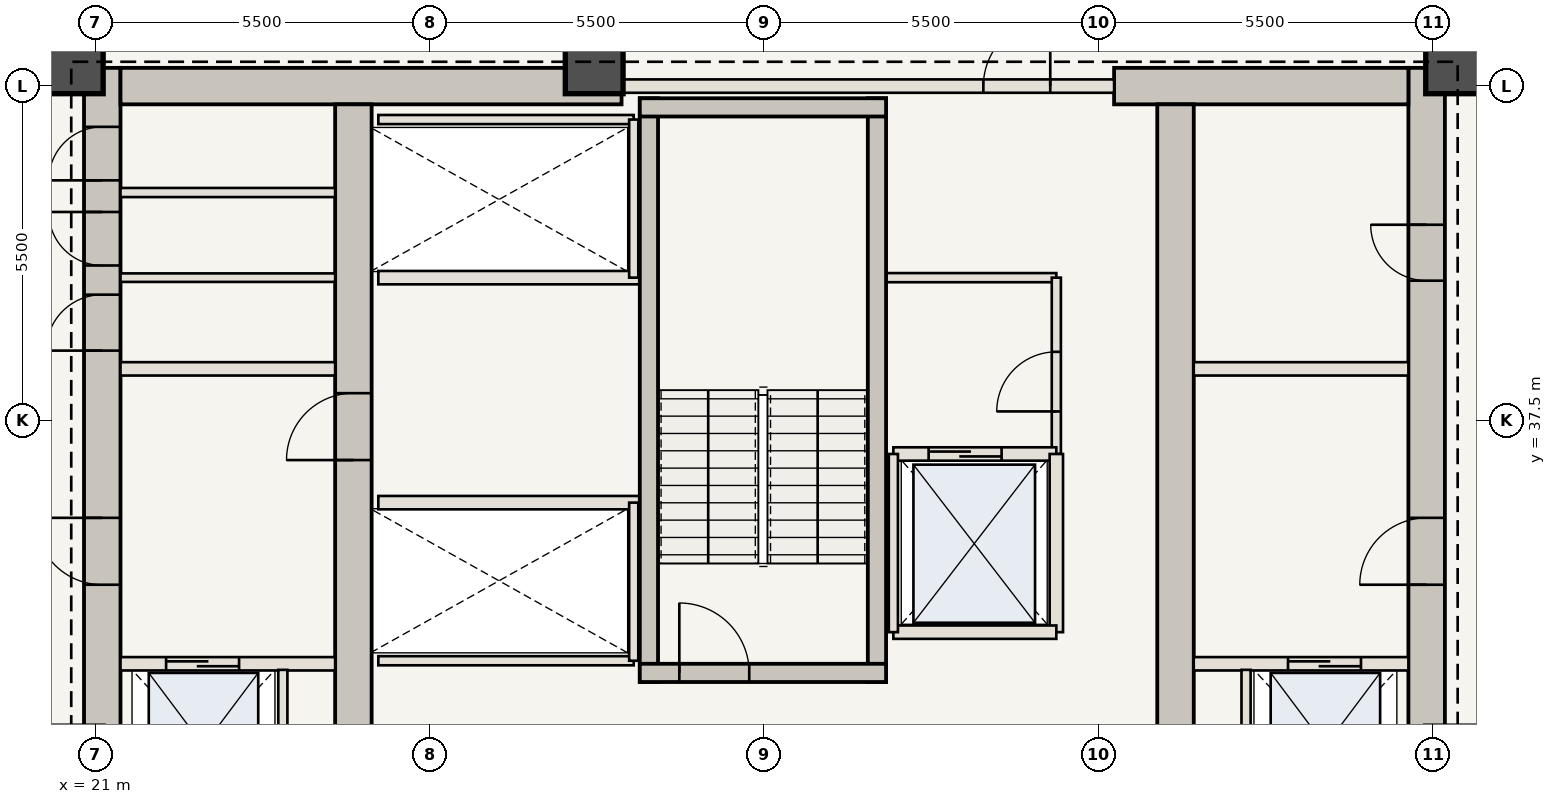
"""IFC4 building model, lengths in metres.
Left out: names, types, materials, properties, quantities, classifications, styles, units other than length and angle.
Written with IfcOpenShell. Run it as: python <this file> out.ifc"""

import sys

from ifc_helpers import new_model, si_unit, direction, frame, frame_2d, origin, origin_2d, place, context, subcontext, project, spatial, rectangle, extrude, element, fill, save


model = new_model("IFC4")
c1 = context("Model", 3, precision=1e-05, world=origin(), true_north=direction((0.0, 1.0)))
c2 = subcontext(c1, "Body", "Model", "MODEL_VIEW")
j1 = project(units=[si_unit("LENGTHUNIT", "METRE"), si_unit("PLANEANGLEUNIT", "RADIAN")], contexts=[c1])
p1 = place(None, origin())
s1 = spatial("IfcSite", under=j1, at=p1, CompositionType="ELEMENT")
p2 = place(p1, origin())
s2 = spatial("IfcBuilding", under=s1, at=p2, CompositionType="ELEMENT")
p3 = place(p2, frame((0.0, 0.0, 164.5)))
s3 = spatial("IfcBuildingStorey", under=s2, at=p3, CompositionType="ELEMENT", Elevation=164.5)
p4 = place(p3, frame((21.11, 30.6, 0.0), z_axis=(0.0, 0.0, 1.0), x_axis=(0.0, 1.0, 0.0)))
e1 = element("IfcWall", 1, at=p4, inside=s3, PredefinedType="SHEAR", context=c2, shape_type="SweptSolid", body=[
    extrude(rectangle(XDim=12.7, YDim=0.6, at=frame_2d((6.35, 0.0))), origin(), (0.0, 0.0, 1.0), 3.85),
])
p5 = place(p4, frame((4.2, 0.0, 0.0)))
e2 = element("IfcOpeningElement", 2, at=p5, cuts=e1, PredefinedType="OPENING", context=c2, shape_type="SweptSolid", body=[
    extrude(rectangle(XDim=1.1, YDim=2.15, at=frame_2d((0.55, 1.075))), frame((0.0, 0.31, 0.0), z_axis=(0.0, -1.0, 0.0), x_axis=(1.0, 0.0, 0.0)), (0.0, 0.0, 1.0), 0.62),
])
p6 = place(p4, frame((8.05, 0.0, 0.0)))
e3 = element("IfcOpeningElement", 3, at=p6, cuts=e1, PredefinedType="OPENING", context=c2, shape_type="SweptSolid", body=[
    extrude(rectangle(XDim=0.92, YDim=2.1, at=frame_2d((0.46, 1.05))), frame((0.0, 0.31, 0.0), z_axis=(0.0, -1.0, 0.0), x_axis=(1.0, 0.0, 0.0)), (0.0, 0.0, 1.0), 0.62),
])
p7 = place(p4, frame((9.45, 0.0, 0.0)))
e4 = element("IfcOpeningElement", 4, at=p7, cuts=e1, PredefinedType="OPENING", context=c2, shape_type="SweptSolid", body=[
    extrude(rectangle(XDim=0.88, YDim=2.1, at=frame_2d((0.44, 1.05))), frame((0.0, 0.31, 0.0), z_axis=(0.0, -1.0, 0.0), x_axis=(1.0, 0.0, 0.0)), (0.0, 0.0, 1.0), 0.62),
])
p8 = place(p4, frame((10.85, 0.0, 0.0)))
e5 = element("IfcOpeningElement", 5, at=p8, cuts=e1, PredefinedType="OPENING", context=c2, shape_type="SweptSolid", body=[
    extrude(rectangle(XDim=0.88, YDim=2.1, at=frame_2d((0.44, 1.05))), frame((0.0, 0.31, 0.0), z_axis=(0.0, -1.0, 0.0), x_axis=(1.0, 0.0, 0.0)), (0.0, 0.0, 1.0), 0.62),
])
p9 = place(p3, frame((42.89, 30.6, 0.0), z_axis=(0.0, 0.0, 1.0), x_axis=(0.0, 1.0, 0.0)))
e6 = element("IfcWall", 6, at=p9, inside=s3, PredefinedType="SHEAR", context=c2, shape_type="SweptSolid", body=[
    extrude(rectangle(XDim=12.7, YDim=0.6, at=frame_2d((6.35, 0.0))), origin(), (0.0, 0.0, 1.0), 3.85),
])
p10 = place(p9, frame((4.2, 0.0, 0.0)))
e7 = element("IfcOpeningElement", 7, at=p10, cuts=e6, PredefinedType="OPENING", context=c2, shape_type="SweptSolid", body=[
    extrude(rectangle(XDim=1.1, YDim=2.15, at=frame_2d((0.55, 1.075))), frame((0.0, 0.31, 0.0), z_axis=(0.0, -1.0, 0.0), x_axis=(1.0, 0.0, 0.0)), (0.0, 0.0, 1.0), 0.62),
])
p11 = place(p9, frame((9.2, 0.0, 0.0)))
e8 = element("IfcOpeningElement", 8, at=p11, cuts=e6, PredefinedType="OPENING", context=c2, shape_type="SweptSolid", body=[
    extrude(rectangle(XDim=0.92, YDim=2.1, at=frame_2d((0.46, 1.05))), frame((0.0, 0.31, 0.0), z_axis=(0.0, -1.0, 0.0), x_axis=(1.0, 0.0, 0.0)), (0.0, 0.0, 1.0), 0.62),
])
p12 = place(p3, frame((21.41, 43.0, 0.0), z_axis=(0.0, 0.0, 1.0), x_axis=(1.0, 0.0, 0.0)))
e9 = element("IfcWall", 9, at=p12, inside=s3, PredefinedType="SHEAR", context=c2, shape_type="SweptSolid", body=[
    extrude(rectangle(XDim=8.24, YDim=0.6, at=frame_2d((4.12, 0.0))), origin(), (0.0, 0.0, 1.0), 3.85),
])
p13 = place(p3, frame((37.75, 43.0, 0.0), z_axis=(0.0, 0.0, 1.0), x_axis=(1.0, 0.0, 0.0)))
e10 = element("IfcWall", 10, at=p13, inside=s3, PredefinedType="SHEAR", context=c2, shape_type="SweptSolid", body=[
    extrude(rectangle(XDim=4.84, YDim=0.6, at=frame_2d((2.42, 0.0))), origin(), (0.0, 0.0, 1.0), 3.85),
])
p14 = place(p3, frame((25.24, 30.6, 0.0), z_axis=(0.0, 0.0, 1.0), x_axis=(0.0, 1.0, 0.0)))
e11 = element("IfcWall", 11, at=p14, inside=s3, PredefinedType="SHEAR", context=c2, shape_type="SweptSolid", body=[
    extrude(rectangle(XDim=12.1, YDim=0.6, at=frame_2d((6.05, 0.0))), origin(), (0.0, 0.0, 1.0), 3.85),
])
p15 = place(p14, frame((6.25, 0.0, 0.0)))
e12 = element("IfcOpeningElement", 12, at=p15, cuts=e11, PredefinedType="OPENING", context=c2, shape_type="SweptSolid", body=[
    extrude(rectangle(XDim=1.1, YDim=2.15, at=frame_2d((0.55, 1.075))), frame((0.0, 0.31, 0.0), z_axis=(0.0, -1.0, 0.0), x_axis=(1.0, 0.0, 0.0)), (0.0, 0.0, 1.0), 0.62),
])
p16 = place(p3, frame((38.76, 30.6, 0.0), z_axis=(0.0, 0.0, 1.0), x_axis=(0.0, 1.0, 0.0)))
e13 = element("IfcWall", 13, at=p16, inside=s3, PredefinedType="SHEAR", context=c2, shape_type="SweptSolid", body=[
    extrude(rectangle(XDim=12.1, YDim=0.6, at=frame_2d((6.05, 0.0))), origin(), (0.0, 0.0, 1.0), 3.85),
])
for number, where, z_axis, x_axis in (
    (14, (43.35, 43.35, 0.0), (0.0, 0.0, 1.0), (1.0, 0.0, 0.0)),
    (15, (29.2, 43.35, 0.0), (0.0, 0.0, 1.0), (1.0, 0.0, 0.0)),
    (16, (20.65, 43.35, 0.0), (0.0, 0.0, 1.0), (1.0, 0.0, 0.0)),
):
    element("IfcColumn", number, at=place(p3, frame(where, z_axis=z_axis, x_axis=x_axis)), inside=s3, PredefinedType="COLUMN", context=c2, shape_type="SweptSolid", body=[
        extrude(rectangle(XDim=0.95, YDim=0.95, at=origin_2d()), origin(), (0.0, 0.0, 1.0), 3.85),
    ])
p17 = place(p3, frame((21.41, 33.5, 0.0), z_axis=(0.0, 0.0, 1.0), x_axis=(1.0, 0.0, 0.0)))
e17 = element("IfcWall", 17, at=p17, inside=s3, PredefinedType="STANDARD", context=c2, shape_type="SweptSolid", body=[
    extrude(rectangle(XDim=3.53, YDim=0.22, at=frame_2d((1.765, 0.0))), origin(), (0.0, 0.0, 1.0), 3.685),
])
p18 = place(p17, frame((0.75, 0.0, 0.0)))
e18 = element("IfcOpeningElement", 18, at=p18, cuts=e17, PredefinedType="OPENING", context=c2, shape_type="SweptSolid", body=[
    extrude(rectangle(XDim=1.2, YDim=2.2, at=frame_2d((0.6, 1.1))), frame((0.0, 0.12, 0.0), z_axis=(0.0, -1.0, 0.0), x_axis=(1.0, 0.0, 0.0)), (0.0, 0.0, 1.0), 0.24),
])
p19 = place(p3, frame((24.08, 30.75, 0.0), z_axis=(0.0, 0.0, 1.0), x_axis=(0.0, 1.0, 0.0)))
e19 = element("IfcWall", 19, at=p19, inside=s3, PredefinedType="STANDARD", context=c2, shape_type="SweptSolid", body=[
    extrude(rectangle(XDim=2.65, YDim=0.15, at=frame_2d((1.325, 0.0))), origin(), (0.0, 0.0, 1.0), 3.685),
])
p20 = place(p3, frame((39.06, 33.5, 0.0), z_axis=(0.0, 0.0, 1.0), x_axis=(1.0, 0.0, 0.0)))
e20 = element("IfcWall", 20, at=p20, inside=s3, PredefinedType="STANDARD", context=c2, shape_type="SweptSolid", body=[
    extrude(rectangle(XDim=3.53, YDim=0.22, at=frame_2d((1.765, 0.0))), origin(), (0.0, 0.0, 1.0), 3.685),
])
p21 = place(p20, frame((1.55, 0.0, 0.0)))
e21 = element("IfcOpeningElement", 21, at=p21, cuts=e20, PredefinedType="OPENING", context=c2, shape_type="SweptSolid", body=[
    extrude(rectangle(XDim=1.2, YDim=2.2, at=frame_2d((0.6, 1.1))), frame((0.0, 0.12, 0.0), z_axis=(0.0, -1.0, 0.0), x_axis=(1.0, 0.0, 0.0)), (0.0, 0.0, 1.0), 0.24),
])
p22 = place(p3, frame((39.92, 30.75, 0.0), z_axis=(0.0, 0.0, 1.0), x_axis=(0.0, 1.0, 0.0)))
e22 = element("IfcWall", 22, at=p22, inside=s3, PredefinedType="STANDARD", context=c2, shape_type="SweptSolid", body=[
    extrude(rectangle(XDim=2.65, YDim=0.15, at=frame_2d((1.325, 0.0))), origin(), (0.0, 0.0, 1.0), 3.685),
])
for number, where, z_axis, x_axis in (
    (23, (21.41, 38.35, 0.0), (0.0, 0.0, 1.0), (1.0, 0.0, 0.0)),
    (24, (39.06, 38.35, 0.0), (0.0, 0.0, 1.0), (1.0, 0.0, 0.0)),
):
    element("IfcWall", number, at=place(p3, frame(where, z_axis=z_axis, x_axis=x_axis)), inside=s3, PredefinedType="STANDARD", context=c2, shape_type="SweptSolid", body=[
        extrude(rectangle(XDim=3.53, YDim=0.22, at=frame_2d((1.765, 0.0))), origin(), (0.0, 0.0, 1.0), 3.685),
    ])
p23 = place(p3, frame((21.41, 39.85, 0.0), z_axis=(0.0, 0.0, 1.0), x_axis=(1.0, 0.0, 0.0)))
e25 = element("IfcWall", 25, at=p23, inside=s3, PredefinedType="STANDARD", context=c2, shape_type="SweptSolid", body=[
    extrude(rectangle(XDim=3.53, YDim=0.14, at=frame_2d((1.765, 0.0))), origin(), (0.0, 0.0, 1.0), 3.685),
])
p24 = place(p3, frame((21.41, 41.25, 0.0), z_axis=(0.0, 0.0, 1.0), x_axis=(1.0, 0.0, 0.0)))
e26 = element("IfcWall", 26, at=p24, inside=s3, PredefinedType="STANDARD", context=c2, shape_type="SweptSolid", body=[
    extrude(rectangle(XDim=3.53, YDim=0.15, at=frame_2d((1.765, 0.0))), origin(), (0.0, 0.0, 1.0), 3.685),
])
p25 = place(p3, frame((34.0, 39.85, 0.0), z_axis=(0.0, 0.0, 1.0), x_axis=(1.0, 0.0, 0.0)))
e27 = element("IfcWall", 27, at=p25, inside=s3, PredefinedType="STANDARD", context=c2, shape_type="SweptSolid", body=[
    extrude(rectangle(XDim=2.8, YDim=0.15, at=frame_2d((1.4, 0.0))), origin(), (0.0, 0.0, 1.0), 3.685),
])
p26 = place(p3, frame((36.8, 36.95, 0.0), z_axis=(0.0, 0.0, 1.0), x_axis=(0.0, 1.0, 0.0)))
e28 = element("IfcWall", 28, at=p26, inside=s3, PredefinedType="STANDARD", context=c2, shape_type="SweptSolid", body=[
    extrude(rectangle(XDim=2.9, YDim=0.15, at=frame_2d((1.45, 0.0))), origin(), (0.0, 0.0, 1.0), 3.685),
])
p27 = place(p26, frame((0.7, 0.0, 0.0)))
e29 = element("IfcOpeningElement", 29, at=p27, cuts=e28, PredefinedType="OPENING", context=c2, shape_type="SweptSolid", body=[
    extrude(rectangle(XDim=0.98, YDim=2.2, at=frame_2d((0.49, 1.1))), frame((0.0, 0.085, 0.0), z_axis=(0.0, -1.0, 0.0), x_axis=(1.0, 0.0, 0.0)), (0.0, 0.0, 1.0), 0.17),
])
p28 = place(p3, frame((25.65, 36.15, 0.0), z_axis=(0.0, 0.0, 1.0), x_axis=(1.0, 0.0, 0.0)))
e30 = element("IfcWall", 30, at=p28, inside=s3, PredefinedType="STANDARD", context=c2, shape_type="SweptSolid", body=[
    extrude(rectangle(XDim=4.3, YDim=0.22, at=frame_2d((2.15, 0.0))), origin(), (0.0, 0.0, 1.0), 3.685),
])
p29 = place(p3, frame((25.65, 33.55, 0.0), z_axis=(0.0, 0.0, 1.0), x_axis=(1.0, 0.0, 0.0)))
e31 = element("IfcWall", 31, at=p29, inside=s3, PredefinedType="STANDARD", context=c2, shape_type="SweptSolid", body=[
    extrude(rectangle(XDim=4.2, YDim=0.15, at=frame_2d((2.1, 0.0))), origin(), (0.0, 0.0, 1.0), 3.685),
])
p30 = place(p3, frame((29.85, 33.55, 0.0), z_axis=(0.0, 0.0, 1.0), x_axis=(0.0, 1.0, 0.0)))
e32 = element("IfcWall", 32, at=p30, inside=s3, PredefinedType="STANDARD", context=c2, shape_type="SweptSolid", body=[
    extrude(rectangle(XDim=2.6, YDim=0.15, at=frame_2d((1.3, 0.0))), origin(), (0.0, 0.0, 1.0), 3.685),
])
p31 = place(p3, frame((25.65, 39.85, 0.0), z_axis=(0.0, 0.0, 1.0), x_axis=(1.0, 0.0, 0.0)))
e33 = element("IfcWall", 33, at=p31, inside=s3, PredefinedType="STANDARD", context=c2, shape_type="SweptSolid", body=[
    extrude(rectangle(XDim=4.3, YDim=0.22, at=frame_2d((2.15, 0.0))), origin(), (0.0, 0.0, 1.0), 3.685),
])
p32 = place(p3, frame((25.65, 42.45, 0.0), z_axis=(0.0, 0.0, 1.0), x_axis=(1.0, 0.0, 0.0)))
e34 = element("IfcWall", 34, at=p32, inside=s3, PredefinedType="STANDARD", context=c2, shape_type="SweptSolid", body=[
    extrude(rectangle(XDim=4.2, YDim=0.15, at=frame_2d((2.1, 0.0))), origin(), (0.0, 0.0, 1.0), 3.685),
])
p33 = place(p3, frame((29.85, 39.85, 0.0), z_axis=(0.0, 0.0, 1.0), x_axis=(0.0, 1.0, 0.0)))
e35 = element("IfcWall", 35, at=p33, inside=s3, PredefinedType="STANDARD", context=c2, shape_type="SweptSolid", body=[
    extrude(rectangle(XDim=2.6, YDim=0.15, at=frame_2d((1.3, 0.0))), origin(), (0.0, 0.0, 1.0), 3.685),
])
for number, where, z_axis, x_axis in (
    (36, (30.1, 33.2, 0.0), (0.0, 0.0, 1.0), (0.0, 1.0, 0.0)),
    (37, (33.85, 33.2, 0.0), (0.0, 0.0, 1.0), (0.0, 1.0, 0.0)),
):
    element("IfcWall", number, at=place(p3, frame(where, z_axis=z_axis, x_axis=x_axis)), inside=s3, PredefinedType="SHEAR", context=c2, shape_type="SweptSolid", body=[
        extrude(rectangle(XDim=9.6, YDim=0.3, at=frame_2d((4.8, 0.0))), origin(), (0.0, 0.0, 1.0), 3.685),
    ])
p34 = place(p3, frame((29.95, 33.35, 0.0), z_axis=(0.0, 0.0, 1.0), x_axis=(1.0, 0.0, 0.0)))
e38 = element("IfcWall", 38, at=p34, inside=s3, PredefinedType="SHEAR", context=c2, shape_type="SweptSolid", body=[
    extrude(rectangle(XDim=4.05, YDim=0.3, at=frame_2d((2.025, 0.0))), origin(), (0.0, 0.0, 1.0), 3.685),
])
p35 = place(p34, frame((0.65, 0.0, 0.0)))
e39 = element("IfcOpeningElement", 39, at=p35, cuts=e38, PredefinedType="OPENING", context=c2, shape_type="SweptSolid", body=[
    extrude(rectangle(XDim=1.15, YDim=2.15, at=frame_2d((0.575, 1.075))), frame((0.0, 0.16, 0.0), z_axis=(0.0, -1.0, 0.0), x_axis=(1.0, 0.0, 0.0)), (0.0, 0.0, 1.0), 0.32),
])
p36 = place(p3, frame((29.95, 42.65, 0.0), z_axis=(0.0, 0.0, 1.0), x_axis=(1.0, 0.0, 0.0)))
e40 = element("IfcWall", 40, at=p36, inside=s3, PredefinedType="SHEAR", context=c2, shape_type="SweptSolid", body=[
    extrude(rectangle(XDim=4.05, YDim=0.3, at=frame_2d((2.025, 0.0))), origin(), (0.0, 0.0, 1.0), 3.685),
])
p37 = place(p3, frame((29.65, 43.0, 0.0), z_axis=(0.0, 0.0, 1.0), x_axis=(1.0, 0.0, 0.0)))
e41 = element("IfcWall", 41, at=p37, inside=s3, PredefinedType="STANDARD", context=c2, shape_type="SweptSolid", body=[
    extrude(rectangle(XDim=8.1, YDim=0.22, at=frame_2d((4.05, 0.0))), origin(), (0.0, 0.0, 1.0), 3.685),
])
p38 = place(p37, frame((5.95, 0.0, 0.0)))
e42 = element("IfcOpeningElement", 42, at=p38, cuts=e41, PredefinedType="OPENING", context=c2, shape_type="SweptSolid", body=[
    extrude(rectangle(XDim=1.1, YDim=2.15, at=frame_2d((0.55, 1.075))), frame((0.0, 0.12, 0.0), z_axis=(0.0, -1.0, 0.0), x_axis=(1.0, 0.0, 0.0)), (0.0, 0.0, 1.0), 0.24),
])
p39 = place(p3, frame((34.12, 36.95, 0.0), z_axis=(0.0, 0.0, 1.0), x_axis=(1.0, 0.0, 0.0)))
e43 = element("IfcWall", 43, at=p39, inside=s3, PredefinedType="STANDARD", context=c2, shape_type="SweptSolid", body=[
    extrude(rectangle(XDim=2.68, YDim=0.22, at=frame_2d((1.34, 0.0))), origin(), (0.0, 0.0, 1.0), 3.685),
])
p40 = place(p39, frame((0.58, 0.0, 0.0)))
e44 = element("IfcOpeningElement", 44, at=p40, cuts=e43, PredefinedType="OPENING", context=c2, shape_type="SweptSolid", body=[
    extrude(rectangle(XDim=1.2, YDim=2.2, at=frame_2d((0.6, 1.1))), frame((0.0, 0.12, 0.0), z_axis=(0.0, -1.0, 0.0), x_axis=(1.0, 0.0, 0.0)), (0.0, 0.0, 1.0), 0.24),
])
p41 = place(p3, frame((36.8, 34.02, 0.0), z_axis=(0.0, 0.0, 1.0), x_axis=(0.0, 1.0, 0.0)))
e45 = element("IfcWall", 45, at=p41, inside=s3, PredefinedType="STANDARD", context=c2, shape_type="SweptSolid", body=[
    extrude(rectangle(XDim=2.93, YDim=0.22, at=frame_2d((1.465, 0.0))), origin(), (0.0, 0.0, 1.0), 3.685),
])
p42 = place(p3, frame((34.12, 34.02, 0.0), z_axis=(0.0, 0.0, 1.0), x_axis=(1.0, 0.0, 0.0)))
e46 = element("IfcWall", 46, at=p42, inside=s3, PredefinedType="STANDARD", context=c2, shape_type="SweptSolid", body=[
    extrude(rectangle(XDim=2.68, YDim=0.22, at=frame_2d((1.34, 0.0))), origin(), (0.0, 0.0, 1.0), 3.685),
])
p43 = place(p3, frame((34.12, 34.02, 0.0), z_axis=(0.0, 0.0, 1.0), x_axis=(0.0, 1.0, 0.0)))
e47 = element("IfcWall", 47, at=p43, inside=s3, PredefinedType="STANDARD", context=c2, shape_type="SweptSolid", body=[
    extrude(rectangle(XDim=2.93, YDim=0.15, at=frame_2d((1.465, 0.0))), origin(), (0.0, 0.0, 1.0), 3.685),
])
p44 = place(p5, origin())
e48 = element("IfcDoor", 48, at=p44, inside=s3, OperationType="SINGLE_SWING_RIGHT", PredefinedType="DOOR", context=c2, shape_type="SweptSolid", body=[
    extrude(rectangle(XDim=1.1, YDim=2.15, at=frame_2d((0.55, 1.075))), frame((0.0, 0.025, 0.0), z_axis=(0.0, -1.0, 0.0), x_axis=(1.0, 0.0, 0.0)), (0.0, 0.0, 1.0), 0.05),
])
fill(e2, e48)
p45 = place(p10, origin())
e49 = element("IfcDoor", 49, at=p45, inside=s3, OperationType="SINGLE_SWING_LEFT", PredefinedType="DOOR", context=c2, shape_type="SweptSolid", body=[
    extrude(rectangle(XDim=1.1, YDim=2.15, at=frame_2d((0.55, 1.075))), frame((0.0, 0.025, 0.0), z_axis=(0.0, -1.0, 0.0), x_axis=(1.0, 0.0, 0.0)), (0.0, 0.0, 1.0), 0.05),
])
fill(e7, e49)
p46 = place(p15, origin())
e50 = element("IfcDoor", 50, at=p46, inside=s3, OperationType="SINGLE_SWING_LEFT", PredefinedType="DOOR", context=c2, shape_type="SweptSolid", body=[
    extrude(rectangle(XDim=1.1, YDim=2.15, at=frame_2d((0.55, 1.075))), frame((0.0, 0.025, 0.0), z_axis=(0.0, -1.0, 0.0), x_axis=(1.0, 0.0, 0.0)), (0.0, 0.0, 1.0), 0.05),
])
fill(e12, e50)
p47 = place(p6, origin())
e51 = element("IfcDoor", 51, at=p47, inside=s3, OperationType="SINGLE_SWING_LEFT", PredefinedType="DOOR", context=c2, shape_type="SweptSolid", body=[
    extrude(rectangle(XDim=0.92, YDim=2.1, at=frame_2d((0.46, 1.05))), frame((0.0, 0.025, 0.0), z_axis=(0.0, -1.0, 0.0), x_axis=(1.0, 0.0, 0.0)), (0.0, 0.0, 1.0), 0.05),
])
fill(e3, e51)
p48 = place(p7, origin())
e52 = element("IfcDoor", 52, at=p48, inside=s3, OperationType="SINGLE_SWING_RIGHT", PredefinedType="DOOR", context=c2, shape_type="SweptSolid", body=[
    extrude(rectangle(XDim=0.88, YDim=2.1, at=frame_2d((0.44, 1.05))), frame((0.0, 0.025, 0.0), z_axis=(0.0, -1.0, 0.0), x_axis=(1.0, 0.0, 0.0)), (0.0, 0.0, 1.0), 0.05),
])
fill(e4, e52)
p49 = place(p8, origin())
e53 = element("IfcDoor", 53, at=p49, inside=s3, OperationType="SINGLE_SWING_LEFT", PredefinedType="DOOR", context=c2, shape_type="SweptSolid", body=[
    extrude(rectangle(XDim=0.88, YDim=2.1, at=frame_2d((0.44, 1.05))), frame((0.0, 0.025, 0.0), z_axis=(0.0, -1.0, 0.0), x_axis=(1.0, 0.0, 0.0)), (0.0, 0.0, 1.0), 0.05),
])
fill(e5, e53)
p50 = place(p11, origin())
e54 = element("IfcDoor", 54, at=p50, inside=s3, OperationType="SINGLE_SWING_RIGHT", PredefinedType="DOOR", context=c2, shape_type="SweptSolid", body=[
    extrude(rectangle(XDim=0.92, YDim=2.1, at=frame_2d((0.46, 1.05))), frame((0.0, 0.025, 0.0), z_axis=(0.0, -1.0, 0.0), x_axis=(1.0, 0.0, 0.0)), (0.0, 0.0, 1.0), 0.05),
])
fill(e8, e54)
p51 = place(p18, origin())
e55 = element("IfcDoor", 55, at=p51, inside=s3, OperationType="DOUBLE_DOOR_SLIDING", PredefinedType="DOOR", context=c2, shape_type="SweptSolid", body=[
    extrude(rectangle(XDim=1.2, YDim=2.2, at=frame_2d((0.6, 1.1))), frame((0.0, 0.025, 0.0), z_axis=(0.0, -1.0, 0.0), x_axis=(1.0, 0.0, 0.0)), (0.0, 0.0, 1.0), 0.05),
])
fill(e18, e55)
p52 = place(p21, origin())
e56 = element("IfcDoor", 56, at=p52, inside=s3, OperationType="DOUBLE_DOOR_SLIDING", PredefinedType="DOOR", context=c2, shape_type="SweptSolid", body=[
    extrude(rectangle(XDim=1.2, YDim=2.2, at=frame_2d((0.6, 1.1))), frame((0.0, 0.025, 0.0), z_axis=(0.0, -1.0, 0.0), x_axis=(1.0, 0.0, 0.0)), (0.0, 0.0, 1.0), 0.05),
])
fill(e21, e56)
p53 = place(p27, origin())
e57 = element("IfcDoor", 57, at=p53, inside=s3, OperationType="SINGLE_SWING_LEFT", PredefinedType="DOOR", context=c2, shape_type="SweptSolid", body=[
    extrude(rectangle(XDim=0.98, YDim=2.2, at=frame_2d((0.49, 1.1))), frame((0.0, 0.025, 0.0), z_axis=(0.0, -1.0, 0.0), x_axis=(1.0, 0.0, 0.0)), (0.0, 0.0, 1.0), 0.05),
])
fill(e29, e57)
p54 = place(p35, origin())
e58 = element("IfcDoor", 58, at=p54, inside=s3, OperationType="SINGLE_SWING_LEFT", PredefinedType="DOOR", context=c2, shape_type="SweptSolid", body=[
    extrude(rectangle(XDim=1.15, YDim=2.15, at=frame_2d((0.575, 1.075))), frame((0.0, 0.025, 0.0), z_axis=(0.0, -1.0, 0.0), x_axis=(1.0, 0.0, 0.0)), (0.0, 0.0, 1.0), 0.05),
])
fill(e39, e58)
p55 = place(p38, origin())
e59 = element("IfcDoor", 59, at=p55, inside=s3, OperationType="SINGLE_SWING_RIGHT", PredefinedType="DOOR", context=c2, shape_type="SweptSolid", body=[
    extrude(rectangle(XDim=1.1, YDim=2.15, at=frame_2d((0.55, 1.075))), frame((0.0, 0.025, 0.0), z_axis=(0.0, -1.0, 0.0), x_axis=(1.0, 0.0, 0.0)), (0.0, 0.0, 1.0), 0.05),
])
fill(e42, e59)
p56 = place(p40, origin())
e60 = element("IfcDoor", 60, at=p56, inside=s3, OperationType="DOUBLE_DOOR_SLIDING", PredefinedType="DOOR", context=c2, shape_type="SweptSolid", body=[
    extrude(rectangle(XDim=1.2, YDim=2.2, at=frame_2d((0.6, 1.1))), frame((0.0, 0.025, 0.0), z_axis=(0.0, -1.0, 0.0), x_axis=(1.0, 0.0, 0.0)), (0.0, 0.0, 1.0), 0.05),
])
fill(e44, e60)
save(model, sys.argv[1])
